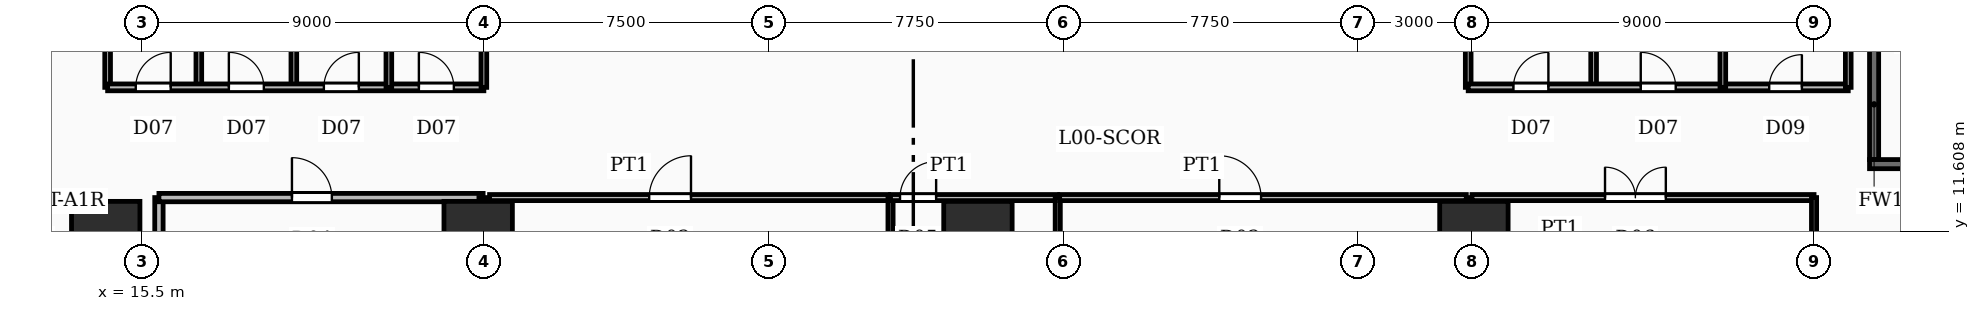
"""IFC4 building model, lengths in metres.
Left out: names, types, materials, properties, quantities, classifications, styles, units other than length and angle.
Written with IfcOpenShell. Run it as: python <this file> out.ifc"""

import sys

from ifc_helpers import new_model, si_unit, direction, frame, frame_2d, origin, origin_2d, place, context, subcontext, project, spatial, rectangle, circle, extrude, element, fill, save


model = new_model("IFC4")
c1 = context("Model", 3, precision=1e-05, world=origin(), true_north=direction((0.0, 1.0)))
c2 = subcontext(c1, "Body", "Model", "MODEL_VIEW")
j1 = project(units=[si_unit("LENGTHUNIT", "METRE"), si_unit("PLANEANGLEUNIT", "RADIAN")], contexts=[c1])
p1 = place(None, origin())
s1 = spatial("IfcSite", under=j1, at=p1, CompositionType="ELEMENT")
p2 = place(p1, origin())
s2 = spatial("IfcBuilding", under=s1, at=p2, CompositionType="ELEMENT")
p3 = place(p2, origin())
s3 = spatial("IfcBuildingStorey", under=s2, at=p3, CompositionType="ELEMENT", Elevation=0.0)
for number, where, z_axis, x_axis in (
    (1, (14.55, 11.5, -0.45), (0.0, 0.0, 1.0), (1.0, 0.0, 0.0)),
    (2, (24.35, 11.5, -0.45), (0.0, 0.0, 1.0), (1.0, 0.0, 0.0)),
    (3, (37.5, 11.5, -0.45), (0.0, 0.0, 1.0), (1.0, 0.0, 0.0)),
    (4, (50.55, 11.5, -0.45), (0.0, 0.0, 1.0), (1.0, 0.0, 0.0)),
):
    element("IfcColumn", number, at=place(p3, frame(where, z_axis=z_axis, x_axis=x_axis)), inside=s3, PredefinedType="COLUMN", context=c2, shape_type="SweptSolid", body=[
        extrude(circle(Radius=0.9, at=origin_2d()), origin(), (0.0, 0.0, 1.0), 8.1),
    ])
p4 = place(p3, frame((60.96, 13.38, 0.0), z_axis=(0.0, 0.0, 1.0), x_axis=(1.0, 0.0, 0.0)))
e5 = element("IfcWall", 5, at=p4, inside=s3, PredefinedType="SOLIDWALL", context=c2, shape_type="SweptSolid", body=[
    extrude(rectangle(XDim=9.88, YDim=0.24, at=frame_2d((4.94, 0.0))), origin(), (0.0, 0.0, 1.0), 7.65),
])
p5 = place(p3, frame((61.08, 13.5, 0.0), z_axis=(0.0, 0.0, 1.0), x_axis=(0.0, 1.0, 0.0)))
e6 = element("IfcWall", 6, at=p5, inside=s3, PredefinedType="SOLIDWALL", context=c2, shape_type="SweptSolid", body=[
    extrude(rectangle(XDim=4.15, YDim=0.24, at=frame_2d((2.075, 0.0))), origin(), (0.0, 0.0, 1.0), 7.65),
])
for number, where, z_axis, x_axis in (
    (7, (17.0, 15.4, 0.0), (0.0, 0.0, 1.0), (0.0, 1.0, 0.0)),
    (8, (19.5, 15.4, 0.0), (0.0, 0.0, 1.0), (0.0, 1.0, 0.0)),
    (9, (22.0, 15.4, 0.0), (0.0, 0.0, 1.0), (0.0, 1.0, 0.0)),
):
    element("IfcWall", number, at=place(p3, frame(where, z_axis=z_axis, x_axis=x_axis)), inside=s3, PredefinedType="PARTITIONING", context=c2, shape_type="SweptSolid", body=[
        extrude(rectangle(XDim=3.58, YDim=0.15, at=frame_2d((1.79, 0.0))), origin(), (0.0, 0.0, 1.0), 6.71),
    ])
p6 = place(p3, frame((14.6, 15.4, 0.0), z_axis=(0.0, 0.0, 1.0), x_axis=(1.0, 0.0, 0.0)))
e10 = element("IfcWall", 10, at=p6, inside=s3, PredefinedType="PARTITIONING", context=c2, shape_type="SweptSolid", body=[
    extrude(rectangle(XDim=9.9, YDim=0.18, at=frame_2d((4.95, 0.0))), origin(), (0.0, 0.0, 1.0), 6.71),
])
p7 = place(p6, frame((0.74, 0.0, 0.0)))
e11 = element("IfcOpeningElement", 11, at=p7, cuts=e10, PredefinedType="OPENING", context=c2, shape_type="SweptSolid", body=[
    extrude(rectangle(XDim=0.92, YDim=2.1, at=frame_2d((0.46, 1.05))), frame((0.0, 0.1, 0.0), z_axis=(0.0, -1.0, 0.0), x_axis=(1.0, 0.0, 0.0)), (0.0, 0.0, 1.0), 0.2),
])
p8 = place(p6, frame((3.19, 0.0, 0.0)))
e12 = element("IfcOpeningElement", 12, at=p8, cuts=e10, PredefinedType="OPENING", context=c2, shape_type="SweptSolid", body=[
    extrude(rectangle(XDim=0.92, YDim=2.1, at=frame_2d((0.46, 1.05))), frame((0.0, 0.1, 0.0), z_axis=(0.0, -1.0, 0.0), x_axis=(1.0, 0.0, 0.0)), (0.0, 0.0, 1.0), 0.2),
])
p9 = place(p6, frame((5.69, 0.0, 0.0)))
e13 = element("IfcOpeningElement", 13, at=p9, cuts=e10, PredefinedType="OPENING", context=c2, shape_type="SweptSolid", body=[
    extrude(rectangle(XDim=0.92, YDim=2.1, at=frame_2d((0.46, 1.05))), frame((0.0, 0.1, 0.0), z_axis=(0.0, -1.0, 0.0), x_axis=(1.0, 0.0, 0.0)), (0.0, 0.0, 1.0), 0.2),
])
p10 = place(p6, frame((8.19, 0.0, 0.0)))
e14 = element("IfcOpeningElement", 14, at=p10, cuts=e10, PredefinedType="OPENING", context=c2, shape_type="SweptSolid", body=[
    extrude(rectangle(XDim=0.92, YDim=2.1, at=frame_2d((0.46, 1.05))), frame((0.0, 0.1, 0.0), z_axis=(0.0, -1.0, 0.0), x_axis=(1.0, 0.0, 0.0)), (0.0, 0.0, 1.0), 0.2),
])
for number, where, z_axis, x_axis in (
    (15, (14.6, 15.4, 0.0), (0.0, 0.0, 1.0), (0.0, 1.0, 0.0)),
    (16, (24.5, 15.4, 0.0), (0.0, 0.0, 1.0), (0.0, 1.0, 0.0)),
    (17, (53.7, 15.4, 0.0), (0.0, 0.0, 1.0), (0.0, 1.0, 0.0)),
    (18, (57.1, 15.4, 0.0), (0.0, 0.0, 1.0), (0.0, 1.0, 0.0)),
):
    element("IfcWall", number, at=place(p3, frame(where, z_axis=z_axis, x_axis=x_axis)), inside=s3, PredefinedType="PARTITIONING", context=c2, shape_type="SweptSolid", body=[
        extrude(rectangle(XDim=3.58, YDim=0.15, at=frame_2d((1.79, 0.0))), origin(), (0.0, 0.0, 1.0), 6.71),
    ])
p11 = place(p3, frame((50.4, 15.4, 0.0), z_axis=(0.0, 0.0, 1.0), x_axis=(1.0, 0.0, 0.0)))
e19 = element("IfcWall", 19, at=p11, inside=s3, PredefinedType="SOLIDWALL", context=c2, shape_type="SweptSolid", body=[
    extrude(rectangle(XDim=10.0, YDim=0.18, at=frame_2d((5.0, 0.0))), origin(), (0.0, 0.0, 1.0), 6.71),
])
p12 = place(p11, frame((1.19, 0.0, 0.0)))
e20 = element("IfcOpeningElement", 20, at=p12, cuts=e19, PredefinedType="OPENING", context=c2, shape_type="SweptSolid", body=[
    extrude(rectangle(XDim=0.92, YDim=2.1, at=frame_2d((0.46, 1.05))), frame((0.0, 0.1, 0.0), z_axis=(0.0, -1.0, 0.0), x_axis=(1.0, 0.0, 0.0)), (0.0, 0.0, 1.0), 0.2),
])
p13 = place(p11, frame((4.54, 0.0, 0.0)))
e21 = element("IfcOpeningElement", 21, at=p13, cuts=e19, PredefinedType="OPENING", context=c2, shape_type="SweptSolid", body=[
    extrude(rectangle(XDim=0.92, YDim=2.1, at=frame_2d((0.46, 1.05))), frame((0.0, 0.1, 0.0), z_axis=(0.0, -1.0, 0.0), x_axis=(1.0, 0.0, 0.0)), (0.0, 0.0, 1.0), 0.2),
])
p14 = place(p11, frame((7.92, 0.0, 0.0)))
e22 = element("IfcOpeningElement", 22, at=p14, cuts=e19, PredefinedType="OPENING", context=c2, shape_type="SweptSolid", body=[
    extrude(rectangle(XDim=0.86, YDim=2.05, at=frame_2d((0.43, 1.025))), frame((0.0, 0.1, 0.0), z_axis=(0.0, -1.0, 0.0), x_axis=(1.0, 0.0, 0.0)), (0.0, 0.0, 1.0), 0.2),
])
for number, where, z_axis, x_axis in (
    (23, (50.4, 15.4, 0.0), (0.0, 0.0, 1.0), (0.0, 1.0, 0.0)),
    (24, (60.4, 15.4, 0.0), (0.0, 0.0, 1.0), (0.0, 1.0, 0.0)),
):
    element("IfcWall", number, at=place(p3, frame(where, z_axis=z_axis, x_axis=x_axis)), inside=s3, PredefinedType="PARTITIONING", context=c2, shape_type="SweptSolid", body=[
        extrude(rectangle(XDim=3.58, YDim=0.15, at=frame_2d((1.79, 0.0))), origin(), (0.0, 0.0, 1.0), 6.71),
    ])
p15 = place(p3, frame((24.65, 12.5, 0.0), z_axis=(0.0, 0.0, 1.0), x_axis=(1.0, 0.0, 0.0)))
e25 = element("IfcWall", 25, at=p15, inside=s3, PredefinedType="PARTITIONING", context=c2, shape_type="SweptSolid", body=[
    extrude(rectangle(XDim=10.5, YDim=0.16, at=frame_2d((5.25, 0.0))), origin(), (0.0, 0.0, 1.0), 6.71),
])
p16 = place(p15, frame((4.2, 0.0, 0.0)))
e26 = element("IfcOpeningElement", 26, at=p16, cuts=e25, PredefinedType="OPENING", context=c2, shape_type="SweptSolid", body=[
    extrude(rectangle(XDim=1.1, YDim=2.15, at=frame_2d((0.55, 1.075))), frame((0.0, 0.09, 0.0), z_axis=(0.0, -1.0, 0.0), x_axis=(1.0, 0.0, 0.0)), (0.0, 0.0, 1.0), 0.18),
])
p17 = place(p3, frame((39.65, 12.5, 0.0), z_axis=(0.0, 0.0, 1.0), x_axis=(1.0, 0.0, 0.0)))
e27 = element("IfcWall", 27, at=p17, inside=s3, PredefinedType="PARTITIONING", context=c2, shape_type="SweptSolid", body=[
    extrude(rectangle(XDim=10.7, YDim=0.16, at=frame_2d((5.35, 0.0))), origin(), (0.0, 0.0, 1.0), 6.71),
])
p18 = place(p17, frame((4.2, 0.0, 0.0)))
e28 = element("IfcOpeningElement", 28, at=p18, cuts=e27, PredefinedType="OPENING", context=c2, shape_type="SweptSolid", body=[
    extrude(rectangle(XDim=1.1, YDim=2.15, at=frame_2d((0.55, 1.075))), frame((0.0, 0.09, 0.0), z_axis=(0.0, -1.0, 0.0), x_axis=(1.0, 0.0, 0.0)), (0.0, 0.0, 1.0), 0.18),
])
p19 = place(p3, frame((15.95, 12.5, 0.0), z_axis=(0.0, 0.0, 1.0), x_axis=(1.0, 0.0, 0.0)))
e29 = element("IfcWall", 29, at=p19, inside=s3, PredefinedType="SOLIDWALL", context=c2, shape_type="SweptSolid", body=[
    extrude(rectangle(XDim=8.53, YDim=0.22, at=frame_2d((4.265, 0.0))), origin(), (0.0, 0.0, 1.0), 6.71),
])
p20 = place(p19, frame((3.5, 0.0, 0.0)))
e30 = element("IfcOpeningElement", 30, at=p20, cuts=e29, PredefinedType="OPENING", context=c2, shape_type="SweptSolid", body=[
    extrude(rectangle(XDim=1.05, YDim=2.15, at=frame_2d((0.525, 1.075))), frame((0.0, 0.12, 0.0), z_axis=(0.0, -1.0, 0.0), x_axis=(1.0, 0.0, 0.0)), (0.0, 0.0, 1.0), 0.24),
])
p21 = place(p3, frame((15.95, 6.15, 0.0), z_axis=(0.0, 0.0, 1.0), x_axis=(0.0, 1.0, 0.0)))
e31 = element("IfcWall", 31, at=p21, inside=s3, PredefinedType="SOLIDWALL", context=c2, shape_type="SweptSolid", body=[
    extrude(rectangle(XDim=6.35, YDim=0.22, at=frame_2d((3.175, 0.0))), origin(), (0.0, 0.0, 1.0), 6.71),
])
p22 = place(p3, frame((24.48, 0.4, 0.0), z_axis=(0.0, 0.0, 1.0), x_axis=(0.0, 1.0, 0.0)))
e32 = element("IfcWall", 32, at=p22, inside=s3, PredefinedType="SOLIDWALL", context=c2, shape_type="SweptSolid", body=[
    extrude(rectangle(XDim=12.1, YDim=0.22, at=frame_2d((6.05, 0.0))), origin(), (0.0, 0.0, 1.0), 6.71),
])
p23 = place(p3, frame((35.2, 12.5, 0.0), z_axis=(0.0, 0.0, 1.0), x_axis=(1.0, 0.0, 0.0)))
e33 = element("IfcWall", 33, at=p23, inside=s3, PredefinedType="PARTITIONING", context=c2, shape_type="SweptSolid", body=[
    extrude(rectangle(XDim=4.4, YDim=0.16, at=frame_2d((2.2, 0.0))), origin(), (0.0, 0.0, 1.0), 6.71),
])
p24 = place(p23, frame((0.25, 0.0, 0.0)))
e34 = element("IfcOpeningElement", 34, at=p24, cuts=e33, PredefinedType="OPENING", context=c2, shape_type="SweptSolid", body=[
    extrude(rectangle(XDim=0.95, YDim=2.15, at=frame_2d((0.475, 1.075))), frame((0.0, 0.09, 0.0), z_axis=(0.0, -1.0, 0.0), x_axis=(1.0, 0.0, 0.0)), (0.0, 0.0, 1.0), 0.18),
])
for number, where, z_axis, x_axis in (
    (35, (35.2, 1.8, 0.0), (0.0, 0.0, 1.0), (0.0, 1.0, 0.0)),
    (36, (39.6, 1.8, 0.0), (0.0, 0.0, 1.0), (0.0, 1.0, 0.0)),
):
    element("IfcWall", number, at=place(p3, frame(where, z_axis=z_axis, x_axis=x_axis)), inside=s3, PredefinedType="PARTITIONING", context=c2, shape_type="SweptSolid", body=[
        extrude(rectangle(XDim=10.7, YDim=0.135, at=frame_2d((5.35, 0.0))), origin(), (0.0, 0.0, 1.0), 6.71),
    ])
p25 = place(p3, frame((50.5, 12.5, 0.0), z_axis=(0.0, 0.0, 1.0), x_axis=(1.0, 0.0, 0.0)))
e37 = element("IfcWall", 37, at=p25, inside=s3, PredefinedType="PARTITIONING", context=c2, shape_type="SweptSolid", body=[
    extrude(rectangle(XDim=9.0, YDim=0.16, at=frame_2d((4.5, 0.0))), origin(), (0.0, 0.0, 1.0), 6.71),
])
p26 = place(p25, frame((3.5, 0.0, 0.0)))
e38 = element("IfcOpeningElement", 38, at=p26, cuts=e37, PredefinedType="OPENING", context=c2, shape_type="SweptSolid", body=[
    extrude(rectangle(XDim=1.6, YDim=2.15, at=frame_2d((0.8, 1.075))), frame((0.0, 0.09, 0.0), z_axis=(0.0, -1.0, 0.0), x_axis=(1.0, 0.0, 0.0)), (0.0, 0.0, 1.0), 0.18),
])
for number, where, z_axis, x_axis in (
    (39, (50.5, 1.8, 0.0), (0.0, 0.0, 1.0), (0.0, 1.0, 0.0)),
    (40, (59.5, 1.8, 0.0), (0.0, 0.0, 1.0), (0.0, 1.0, 0.0)),
):
    element("IfcWall", number, at=place(p3, frame(where, z_axis=z_axis, x_axis=x_axis)), inside=s3, PredefinedType="PARTITIONING", context=c2, shape_type="SweptSolid", body=[
        extrude(rectangle(XDim=10.7, YDim=0.135, at=frame_2d((5.35, 0.0))), origin(), (0.0, 0.0, 1.0), 6.71),
    ])
p27 = place(p7, origin())
e41 = element("IfcDoor", 41, at=p27, inside=s3, OperationType="SINGLE_SWING_RIGHT", PredefinedType="DOOR", context=c2, shape_type="SweptSolid", body=[
    extrude(rectangle(XDim=0.92, YDim=2.1, at=frame_2d((0.46, 1.05))), frame((0.0, 0.025, 0.0), z_axis=(0.0, -1.0, 0.0), x_axis=(1.0, 0.0, 0.0)), (0.0, 0.0, 1.0), 0.05),
])
fill(e11, e41)
p28 = place(p8, origin())
e42 = element("IfcDoor", 42, at=p28, inside=s3, OperationType="SINGLE_SWING_LEFT", PredefinedType="DOOR", context=c2, shape_type="SweptSolid", body=[
    extrude(rectangle(XDim=0.92, YDim=2.1, at=frame_2d((0.46, 1.05))), frame((0.0, 0.025, 0.0), z_axis=(0.0, -1.0, 0.0), x_axis=(1.0, 0.0, 0.0)), (0.0, 0.0, 1.0), 0.05),
])
fill(e12, e42)
p29 = place(p9, origin())
e43 = element("IfcDoor", 43, at=p29, inside=s3, OperationType="SINGLE_SWING_RIGHT", PredefinedType="DOOR", context=c2, shape_type="SweptSolid", body=[
    extrude(rectangle(XDim=0.92, YDim=2.1, at=frame_2d((0.46, 1.05))), frame((0.0, 0.025, 0.0), z_axis=(0.0, -1.0, 0.0), x_axis=(1.0, 0.0, 0.0)), (0.0, 0.0, 1.0), 0.05),
])
fill(e13, e43)
p30 = place(p10, origin())
e44 = element("IfcDoor", 44, at=p30, inside=s3, OperationType="SINGLE_SWING_LEFT", PredefinedType="DOOR", context=c2, shape_type="SweptSolid", body=[
    extrude(rectangle(XDim=0.92, YDim=2.1, at=frame_2d((0.46, 1.05))), frame((0.0, 0.025, 0.0), z_axis=(0.0, -1.0, 0.0), x_axis=(1.0, 0.0, 0.0)), (0.0, 0.0, 1.0), 0.05),
])
fill(e14, e44)
p31 = place(p12, origin())
e45 = element("IfcDoor", 45, at=p31, inside=s3, OperationType="SINGLE_SWING_RIGHT", PredefinedType="DOOR", context=c2, shape_type="SweptSolid", body=[
    extrude(rectangle(XDim=0.92, YDim=2.1, at=frame_2d((0.46, 1.05))), frame((0.0, 0.025, 0.0), z_axis=(0.0, -1.0, 0.0), x_axis=(1.0, 0.0, 0.0)), (0.0, 0.0, 1.0), 0.05),
])
fill(e20, e45)
p32 = place(p13, origin())
e46 = element("IfcDoor", 46, at=p32, inside=s3, OperationType="SINGLE_SWING_LEFT", PredefinedType="DOOR", context=c2, shape_type="SweptSolid", body=[
    extrude(rectangle(XDim=0.92, YDim=2.1, at=frame_2d((0.46, 1.05))), frame((0.0, 0.025, 0.0), z_axis=(0.0, -1.0, 0.0), x_axis=(1.0, 0.0, 0.0)), (0.0, 0.0, 1.0), 0.05),
])
fill(e21, e46)
p33 = place(p14, origin())
e47 = element("IfcDoor", 47, at=p33, inside=s3, OperationType="SINGLE_SWING_RIGHT", PredefinedType="DOOR", context=c2, shape_type="SweptSolid", body=[
    extrude(rectangle(XDim=0.86, YDim=2.05, at=frame_2d((0.43, 1.025))), frame((0.0, 0.025, 0.0), z_axis=(0.0, -1.0, 0.0), x_axis=(1.0, 0.0, 0.0)), (0.0, 0.0, 1.0), 0.05),
])
fill(e22, e47)
p34 = place(p16, origin())
e48 = element("IfcDoor", 48, at=p34, inside=s3, OperationType="SINGLE_SWING_RIGHT", PredefinedType="DOOR", context=c2, shape_type="SweptSolid", body=[
    extrude(rectangle(XDim=1.1, YDim=2.15, at=frame_2d((0.55, 1.075))), frame((0.0, 0.025, 0.0), z_axis=(0.0, -1.0, 0.0), x_axis=(1.0, 0.0, 0.0)), (0.0, 0.0, 1.0), 0.05),
])
fill(e26, e48)
p35 = place(p18, origin())
e49 = element("IfcDoor", 49, at=p35, inside=s3, OperationType="SINGLE_SWING_LEFT", PredefinedType="DOOR", context=c2, shape_type="SweptSolid", body=[
    extrude(rectangle(XDim=1.1, YDim=2.15, at=frame_2d((0.55, 1.075))), frame((0.0, 0.025, 0.0), z_axis=(0.0, -1.0, 0.0), x_axis=(1.0, 0.0, 0.0)), (0.0, 0.0, 1.0), 0.05),
])
fill(e28, e49)
p36 = place(p20, origin())
e50 = element("IfcDoor", 50, at=p36, inside=s3, OperationType="SINGLE_SWING_LEFT", PredefinedType="DOOR", context=c2, shape_type="SweptSolid", body=[
    extrude(rectangle(XDim=1.05, YDim=2.15, at=frame_2d((0.525, 1.075))), frame((0.0, 0.025, 0.0), z_axis=(0.0, -1.0, 0.0), x_axis=(1.0, 0.0, 0.0)), (0.0, 0.0, 1.0), 0.05),
])
fill(e30, e50)
p37 = place(p24, origin())
e51 = element("IfcDoor", 51, at=p37, inside=s3, OperationType="SINGLE_SWING_RIGHT", PredefinedType="DOOR", context=c2, shape_type="SweptSolid", body=[
    extrude(rectangle(XDim=0.95, YDim=2.15, at=frame_2d((0.475, 1.075))), frame((0.0, 0.025, 0.0), z_axis=(0.0, -1.0, 0.0), x_axis=(1.0, 0.0, 0.0)), (0.0, 0.0, 1.0), 0.05),
])
fill(e34, e51)
p38 = place(p26, origin())
e52 = element("IfcDoor", 52, at=p38, inside=s3, OperationType="DOUBLE_DOOR_SINGLE_SWING", PredefinedType="DOOR", context=c2, shape_type="SweptSolid", body=[
    extrude(rectangle(XDim=1.6, YDim=2.15, at=frame_2d((0.8, 1.075))), frame((0.0, 0.025, 0.0), z_axis=(0.0, -1.0, 0.0), x_axis=(1.0, 0.0, 0.0)), (0.0, 0.0, 1.0), 0.05),
])
fill(e38, e52)
save(model, sys.argv[1])
